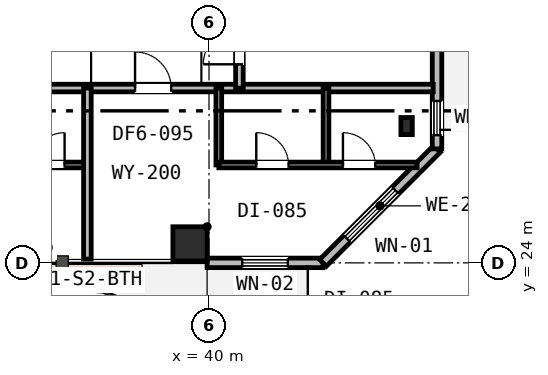
"""IFC4 building model, lengths in metres.
Left out: names, types, materials, properties, quantities, classifications, styles, units other than length and angle.
Written with IfcOpenShell. Run it as: python <this file> out.ifc"""

import sys

from ifc_helpers import new_model, si_unit, direction, frame, frame_2d, origin, origin_2d, place, context, subcontext, project, spatial, rectangle, i_section, extrude, element, fill, save


model = new_model("IFC4")
c1 = context("Model", 3, precision=1e-05, world=origin(), true_north=direction((0.0, 1.0)))
c2 = subcontext(c1, "Body", "Model", "MODEL_VIEW")
j1 = project(units=[si_unit("LENGTHUNIT", "METRE"), si_unit("PLANEANGLEUNIT", "RADIAN")], contexts=[c1])
p1 = place(None, origin())
s1 = spatial("IfcSite", under=j1, at=p1, CompositionType="ELEMENT")
p2 = place(p1, origin())
s2 = spatial("IfcBuilding", under=s1, at=p2, CompositionType="ELEMENT")
p3 = place(p2, frame((0.0, 0.0, 237.4)))
s3 = spatial("IfcBuildingStorey", under=s2, at=p3, CompositionType="ELEMENT", Elevation=237.4)
p4 = place(p3, frame((39.5, 24.5, 0.0), z_axis=(0.0, 0.0, 1.0), x_axis=(1.0, 0.0, 0.0)))
e1 = element("IfcColumn", 1, at=p4, inside=s3, PredefinedType="COLUMN", context=c2, shape_type="SweptSolid", body=[
    extrude(rectangle(XDim=0.9, YDim=0.9, at=origin_2d()), origin(), (0.0, 0.0, 1.0), 3.8),
])
p5 = place(p3, frame((45.2, 27.6, 0.0), z_axis=(0.0, 0.0, 1.0), x_axis=(1.0, 0.0, 0.0)))
e2 = element("IfcColumn", 2, at=p5, inside=s3, PredefinedType="COLUMN", context=c2, shape_type="SweptSolid", body=[
    extrude(i_section(OverallWidth=0.3, OverallDepth=0.45, WebThickness=0.014, FlangeThickness=0.026, FilletRadius=0.027, at=origin_2d()), origin(), (0.0, 0.0, 1.0), 3.8),
])
p6 = place(p3, frame((39.95, 24.0, 0.0), z_axis=(0.0, 0.0, 1.0), x_axis=(1.0, 0.0, 0.0)))
e3 = element("IfcWall", 3, at=p6, inside=s3, PredefinedType="STANDARD", context=c2, shape_type="SweptSolid", body=[
    extrude(rectangle(XDim=3.05, YDim=0.25, at=frame_2d((1.525, 0.0))), origin(), (0.0, 0.0, 1.0), 3.53),
])
p7 = place(p6, frame((0.925, 0.0, 0.85)))
e4 = element("IfcOpeningElement", 4, at=p7, cuts=e3, PredefinedType="OPENING", context=c2, shape_type="SweptSolid", body=[
    extrude(rectangle(XDim=1.2, YDim=1.6, at=frame_2d((0.6, 0.8))), frame((0.0, 0.135, 0.0), z_axis=(0.0, -1.0, 0.0), x_axis=(1.0, 0.0, 0.0)), (0.0, 0.0, 1.0), 0.27),
])
p8 = place(p3, frame((43.0, 24.0, 0.0), z_axis=(0.0, 0.0, 1.0), x_axis=(0.707106781187, 0.707106781187, 0.0)))
e5 = element("IfcWall", 5, at=p8, inside=s3, PredefinedType="STANDARD", context=c2, shape_type="SweptSolid", body=[
    extrude(rectangle(XDim=4.243, YDim=0.25, at=frame_2d((2.121, 0.0))), origin(), (0.0, 0.0, 1.0), 3.53),
])
p9 = place(p8, frame((0.896, 0.0, 0.75)))
e6 = element("IfcOpeningElement", 6, at=p9, cuts=e5, PredefinedType="OPENING", context=c2, shape_type="SweptSolid", body=[
    extrude(rectangle(XDim=1.8, YDim=1.85, at=frame_2d((0.9, 0.925))), frame((0.0, 0.135, 0.0), z_axis=(0.0, -1.0, 0.0), x_axis=(1.0, 0.0, 0.0)), (0.0, 0.0, 1.0), 0.27),
])
p10 = place(p3, frame((46.0, 27.0, 0.0), z_axis=(0.0, 0.0, 1.0), x_axis=(0.0, 1.0, 0.0)))
e7 = element("IfcWall", 7, at=p10, inside=s3, PredefinedType="STANDARD", context=c2, shape_type="SweptSolid", body=[
    extrude(rectangle(XDim=2.9, YDim=0.25, at=frame_2d((1.45, 0.0))), origin(), (0.0, 0.0, 1.0), 3.53),
])
p11 = place(p10, frame((0.36, 0.0, 0.9)))
e8 = element("IfcOpeningElement", 8, at=p11, cuts=e7, PredefinedType="OPENING", context=c2, shape_type="SweptSolid", body=[
    extrude(rectangle(XDim=0.9, YDim=1.55, at=frame_2d((0.45, 0.775))), frame((0.0, 0.135, 0.0), z_axis=(0.0, -1.0, 0.0), x_axis=(1.0, 0.0, 0.0)), (0.0, 0.0, 1.0), 0.27),
])
p12 = place(p3, frame((20.2, 28.6, 0.0), z_axis=(0.0, 0.0, 1.0), x_axis=(1.0, 0.0, 0.0)))
e9 = element("IfcWall", 9, at=p12, inside=s3, PredefinedType="PARTITIONING", context=c2, shape_type="SweptSolid", body=[
    extrude(rectangle(XDim=25.7, YDim=0.2, at=frame_2d((12.85, 0.0))), origin(), (0.0, 0.0, 1.0), 2.92),
])
p13 = place(p12, frame((4.475, 0.0, 0.0)))
e10 = element("IfcOpeningElement", 10, at=p13, cuts=e9, PredefinedType="OPENING", context=c2, shape_type="SweptSolid", body=[
    extrude(rectangle(XDim=0.95, YDim=2.15, at=frame_2d((0.475, 1.075))), frame((0.0, 0.11, 0.0), z_axis=(0.0, -1.0, 0.0), x_axis=(1.0, 0.0, 0.0)), (0.0, 0.0, 1.0), 0.22),
])
p14 = place(p12, frame((10.875, 0.0, 0.0)))
e11 = element("IfcOpeningElement", 11, at=p14, cuts=e9, PredefinedType="OPENING", context=c2, shape_type="SweptSolid", body=[
    extrude(rectangle(XDim=0.95, YDim=2.15, at=frame_2d((0.475, 1.075))), frame((0.0, 0.11, 0.0), z_axis=(0.0, -1.0, 0.0), x_axis=(1.0, 0.0, 0.0)), (0.0, 0.0, 1.0), 0.22),
])
p15 = place(p12, frame((17.854, 0.0, 0.0)))
e12 = element("IfcOpeningElement", 12, at=p15, cuts=e9, PredefinedType="OPENING", context=c2, shape_type="SweptSolid", body=[
    extrude(rectangle(XDim=0.95, YDim=2.15, at=frame_2d((0.475, 1.075))), frame((0.0, 0.11, 0.0), z_axis=(0.0, -1.0, 0.0), x_axis=(1.0, 0.0, 0.0)), (0.0, 0.0, 1.0), 0.22),
])
p16 = place(p3, frame((40.8, 28.6, 0.0), z_axis=(0.0, 0.0, 1.0), x_axis=(0.0, 1.0, 0.0)))
e13 = element("IfcWall", 13, at=p16, inside=s3, PredefinedType="PARTITIONING", context=c2, shape_type="SweptSolid", body=[
    extrude(rectangle(XDim=14.3, YDim=0.2, at=frame_2d((7.15, 0.0))), origin(), (0.0, 0.0, 1.0), 2.92),
])
p17 = place(p16, frame((0.625, 0.0, 0.0)))
e14 = element("IfcOpeningElement", 14, at=p17, cuts=e13, PredefinedType="OPENING", context=c2, shape_type="SweptSolid", body=[
    extrude(rectangle(XDim=0.95, YDim=2.15, at=frame_2d((0.475, 1.075))), frame((0.0, 0.11, 0.0), z_axis=(0.0, -1.0, 0.0), x_axis=(1.0, 0.0, 0.0)), (0.0, 0.0, 1.0), 0.22),
])
p18 = place(p3, frame((32.7, 26.576, 0.0), z_axis=(0.0, 0.0, 1.0), x_axis=(1.0, 0.0, 0.0)))
e15 = element("IfcWall", 15, at=p18, inside=s3, PredefinedType="PARTITIONING", context=c2, shape_type="SweptSolid", body=[
    extrude(rectangle(XDim=4.1, YDim=0.15, at=frame_2d((2.05, 0.0))), origin(), (0.0, 0.0, 1.0), 3.22),
])
p19 = place(p18, frame((0.6, 0.0, 0.0)))
e16 = element("IfcOpeningElement", 16, at=p19, cuts=e15, PredefinedType="OPENING", context=c2, shape_type="SweptSolid", body=[
    extrude(rectangle(XDim=0.85, YDim=2.15, at=frame_2d((0.425, 1.075))), frame((0.0, 0.085, 0.0), z_axis=(0.0, -1.0, 0.0), x_axis=(1.0, 0.0, 0.0)), (0.0, 0.0, 1.0), 0.17),
])
p20 = place(p18, frame((2.65, 0.0, 0.0)))
e17 = element("IfcOpeningElement", 17, at=p20, cuts=e15, PredefinedType="OPENING", context=c2, shape_type="SweptSolid", body=[
    extrude(rectangle(XDim=0.85, YDim=2.15, at=frame_2d((0.425, 1.075))), frame((0.0, 0.085, 0.0), z_axis=(0.0, -1.0, 0.0), x_axis=(1.0, 0.0, 0.0)), (0.0, 0.0, 1.0), 0.17),
])
p21 = place(p3, frame((36.8, 24.1, 0.0), z_axis=(0.0, 0.0, 1.0), x_axis=(0.0, 1.0, 0.0)))
e18 = element("IfcWall", 18, at=p21, inside=s3, PredefinedType="PARTITIONING", context=c2, shape_type="SweptSolid", body=[
    extrude(rectangle(XDim=4.5, YDim=0.2, at=frame_2d((2.25, 0.0))), origin(), (0.0, 0.0, 1.0), 3.22),
])
for number, where, z_axis, x_axis in (
    (19, (40.258, 26.576, 0.0), (0.0, 0.0, 1.0), (0.0, 1.0, 0.0)),
    (20, (43.079, 26.576, 0.0), (0.0, 0.0, 1.0), (0.0, 1.0, 0.0)),
):
    element("IfcWall", number, at=place(p3, frame(where, z_axis=z_axis, x_axis=x_axis)), inside=s3, PredefinedType="PARTITIONING", context=c2, shape_type="SweptSolid", body=[
        extrude(rectangle(XDim=2.024, YDim=0.15, at=frame_2d((1.012, 0.0))), origin(), (0.0, 0.0, 1.0), 3.53),
    ])
p22 = place(p3, frame((40.258, 26.576, 0.0), z_axis=(0.0, 0.0, 1.0), x_axis=(1.0, 0.0, 0.0)))
e21 = element("IfcWall", 21, at=p22, inside=s3, PredefinedType="PARTITIONING", context=c2, shape_type="SweptSolid", body=[
    extrude(rectangle(XDim=5.218, YDim=0.15, at=frame_2d((2.609, 0.0))), origin(), (0.0, 0.0, 1.0), 3.53),
])
p23 = place(p22, frame((0.986, 0.0, 0.0)))
e22 = element("IfcOpeningElement", 22, at=p23, cuts=e21, PredefinedType="OPENING", context=c2, shape_type="SweptSolid", body=[
    extrude(rectangle(XDim=0.85, YDim=2.15, at=frame_2d((0.425, 1.075))), frame((0.0, 0.085, 0.0), z_axis=(0.0, -1.0, 0.0), x_axis=(1.0, 0.0, 0.0)), (0.0, 0.0, 1.0), 0.17),
])
p24 = place(p22, frame((3.267, 0.0, 0.0)))
e23 = element("IfcOpeningElement", 23, at=p24, cuts=e21, PredefinedType="OPENING", context=c2, shape_type="SweptSolid", body=[
    extrude(rectangle(XDim=0.85, YDim=2.15, at=frame_2d((0.425, 1.075))), frame((0.0, 0.085, 0.0), z_axis=(0.0, -1.0, 0.0), x_axis=(1.0, 0.0, 0.0)), (0.0, 0.0, 1.0), 0.17),
])
p25 = place(p7, origin())
e24 = element("IfcWindow", 24, at=p25, inside=s3, PartitioningType="SINGLE_PANEL", PredefinedType="WINDOW", context=c2, shape_type="SweptSolid", body=[
    extrude(rectangle(XDim=1.2, YDim=1.6, at=frame_2d((0.6, 0.8))), frame((0.0, 0.03, 0.0), z_axis=(0.0, -1.0, 0.0), x_axis=(1.0, 0.0, 0.0)), (0.0, 0.0, 1.0), 0.06),
])
fill(e4, e24)
p26 = place(p9, origin())
e25 = element("IfcWindow", 25, at=p26, inside=s3, PartitioningType="SINGLE_PANEL", PredefinedType="WINDOW", context=c2, shape_type="SweptSolid", body=[
    extrude(rectangle(XDim=1.8, YDim=1.85, at=frame_2d((0.9, 0.925))), frame((0.0, 0.03, 0.0), z_axis=(0.0, -1.0, 0.0), x_axis=(1.0, 0.0, 0.0)), (0.0, 0.0, 1.0), 0.06),
])
fill(e6, e25)
p27 = place(p11, origin())
e26 = element("IfcWindow", 26, at=p27, inside=s3, PartitioningType="SINGLE_PANEL", PredefinedType="WINDOW", context=c2, shape_type="SweptSolid", body=[
    extrude(rectangle(XDim=0.9, YDim=1.55, at=frame_2d((0.45, 0.775))), frame((0.0, 0.03, 0.0), z_axis=(0.0, -1.0, 0.0), x_axis=(1.0, 0.0, 0.0)), (0.0, 0.0, 1.0), 0.06),
])
fill(e8, e26)
p28 = place(p17, origin())
e27 = element("IfcDoor", 27, at=p28, inside=s3, OperationType="SINGLE_SWING_LEFT", PredefinedType="DOOR", context=c2, shape_type="SweptSolid", body=[
    extrude(rectangle(XDim=0.95, YDim=2.15, at=frame_2d((0.475, 1.075))), frame((0.0, 0.025, 0.0), z_axis=(0.0, -1.0, 0.0), x_axis=(1.0, 0.0, 0.0)), (0.0, 0.0, 1.0), 0.05),
])
fill(e14, e27)
p29 = place(p20, origin())
e28 = element("IfcDoor", 28, at=p29, inside=s3, OperationType="SINGLE_SWING_RIGHT", PredefinedType="DOOR", context=c2, shape_type="SweptSolid", body=[
    extrude(rectangle(XDim=0.85, YDim=2.15, at=frame_2d((0.425, 1.075))), frame((0.0, 0.025, 0.0), z_axis=(0.0, -1.0, 0.0), x_axis=(1.0, 0.0, 0.0)), (0.0, 0.0, 1.0), 0.05),
])
fill(e17, e28)
p30 = place(p15, origin())
e29 = element("IfcDoor", 29, at=p30, inside=s3, OperationType="SINGLE_SWING_LEFT", PredefinedType="DOOR", context=c2, shape_type="SweptSolid", body=[
    extrude(rectangle(XDim=0.95, YDim=2.15, at=frame_2d((0.475, 1.075))), frame((0.0, 0.025, 0.0), z_axis=(0.0, -1.0, 0.0), x_axis=(1.0, 0.0, 0.0)), (0.0, 0.0, 1.0), 0.05),
])
fill(e12, e29)
p31 = place(p23, origin())
e30 = element("IfcDoor", 30, at=p31, inside=s3, OperationType="SINGLE_SWING_LEFT", PredefinedType="DOOR", context=c2, shape_type="SweptSolid", body=[
    extrude(rectangle(XDim=0.85, YDim=2.15, at=frame_2d((0.425, 1.075))), frame((0.0, 0.025, 0.0), z_axis=(0.0, -1.0, 0.0), x_axis=(1.0, 0.0, 0.0)), (0.0, 0.0, 1.0), 0.05),
])
fill(e22, e30)
p32 = place(p24, origin())
e31 = element("IfcDoor", 31, at=p32, inside=s3, OperationType="SINGLE_SWING_LEFT", PredefinedType="DOOR", context=c2, shape_type="SweptSolid", body=[
    extrude(rectangle(XDim=0.85, YDim=2.15, at=frame_2d((0.425, 1.075))), frame((0.0, 0.025, 0.0), z_axis=(0.0, -1.0, 0.0), x_axis=(1.0, 0.0, 0.0)), (0.0, 0.0, 1.0), 0.05),
])
fill(e23, e31)
save(model, sys.argv[1])
